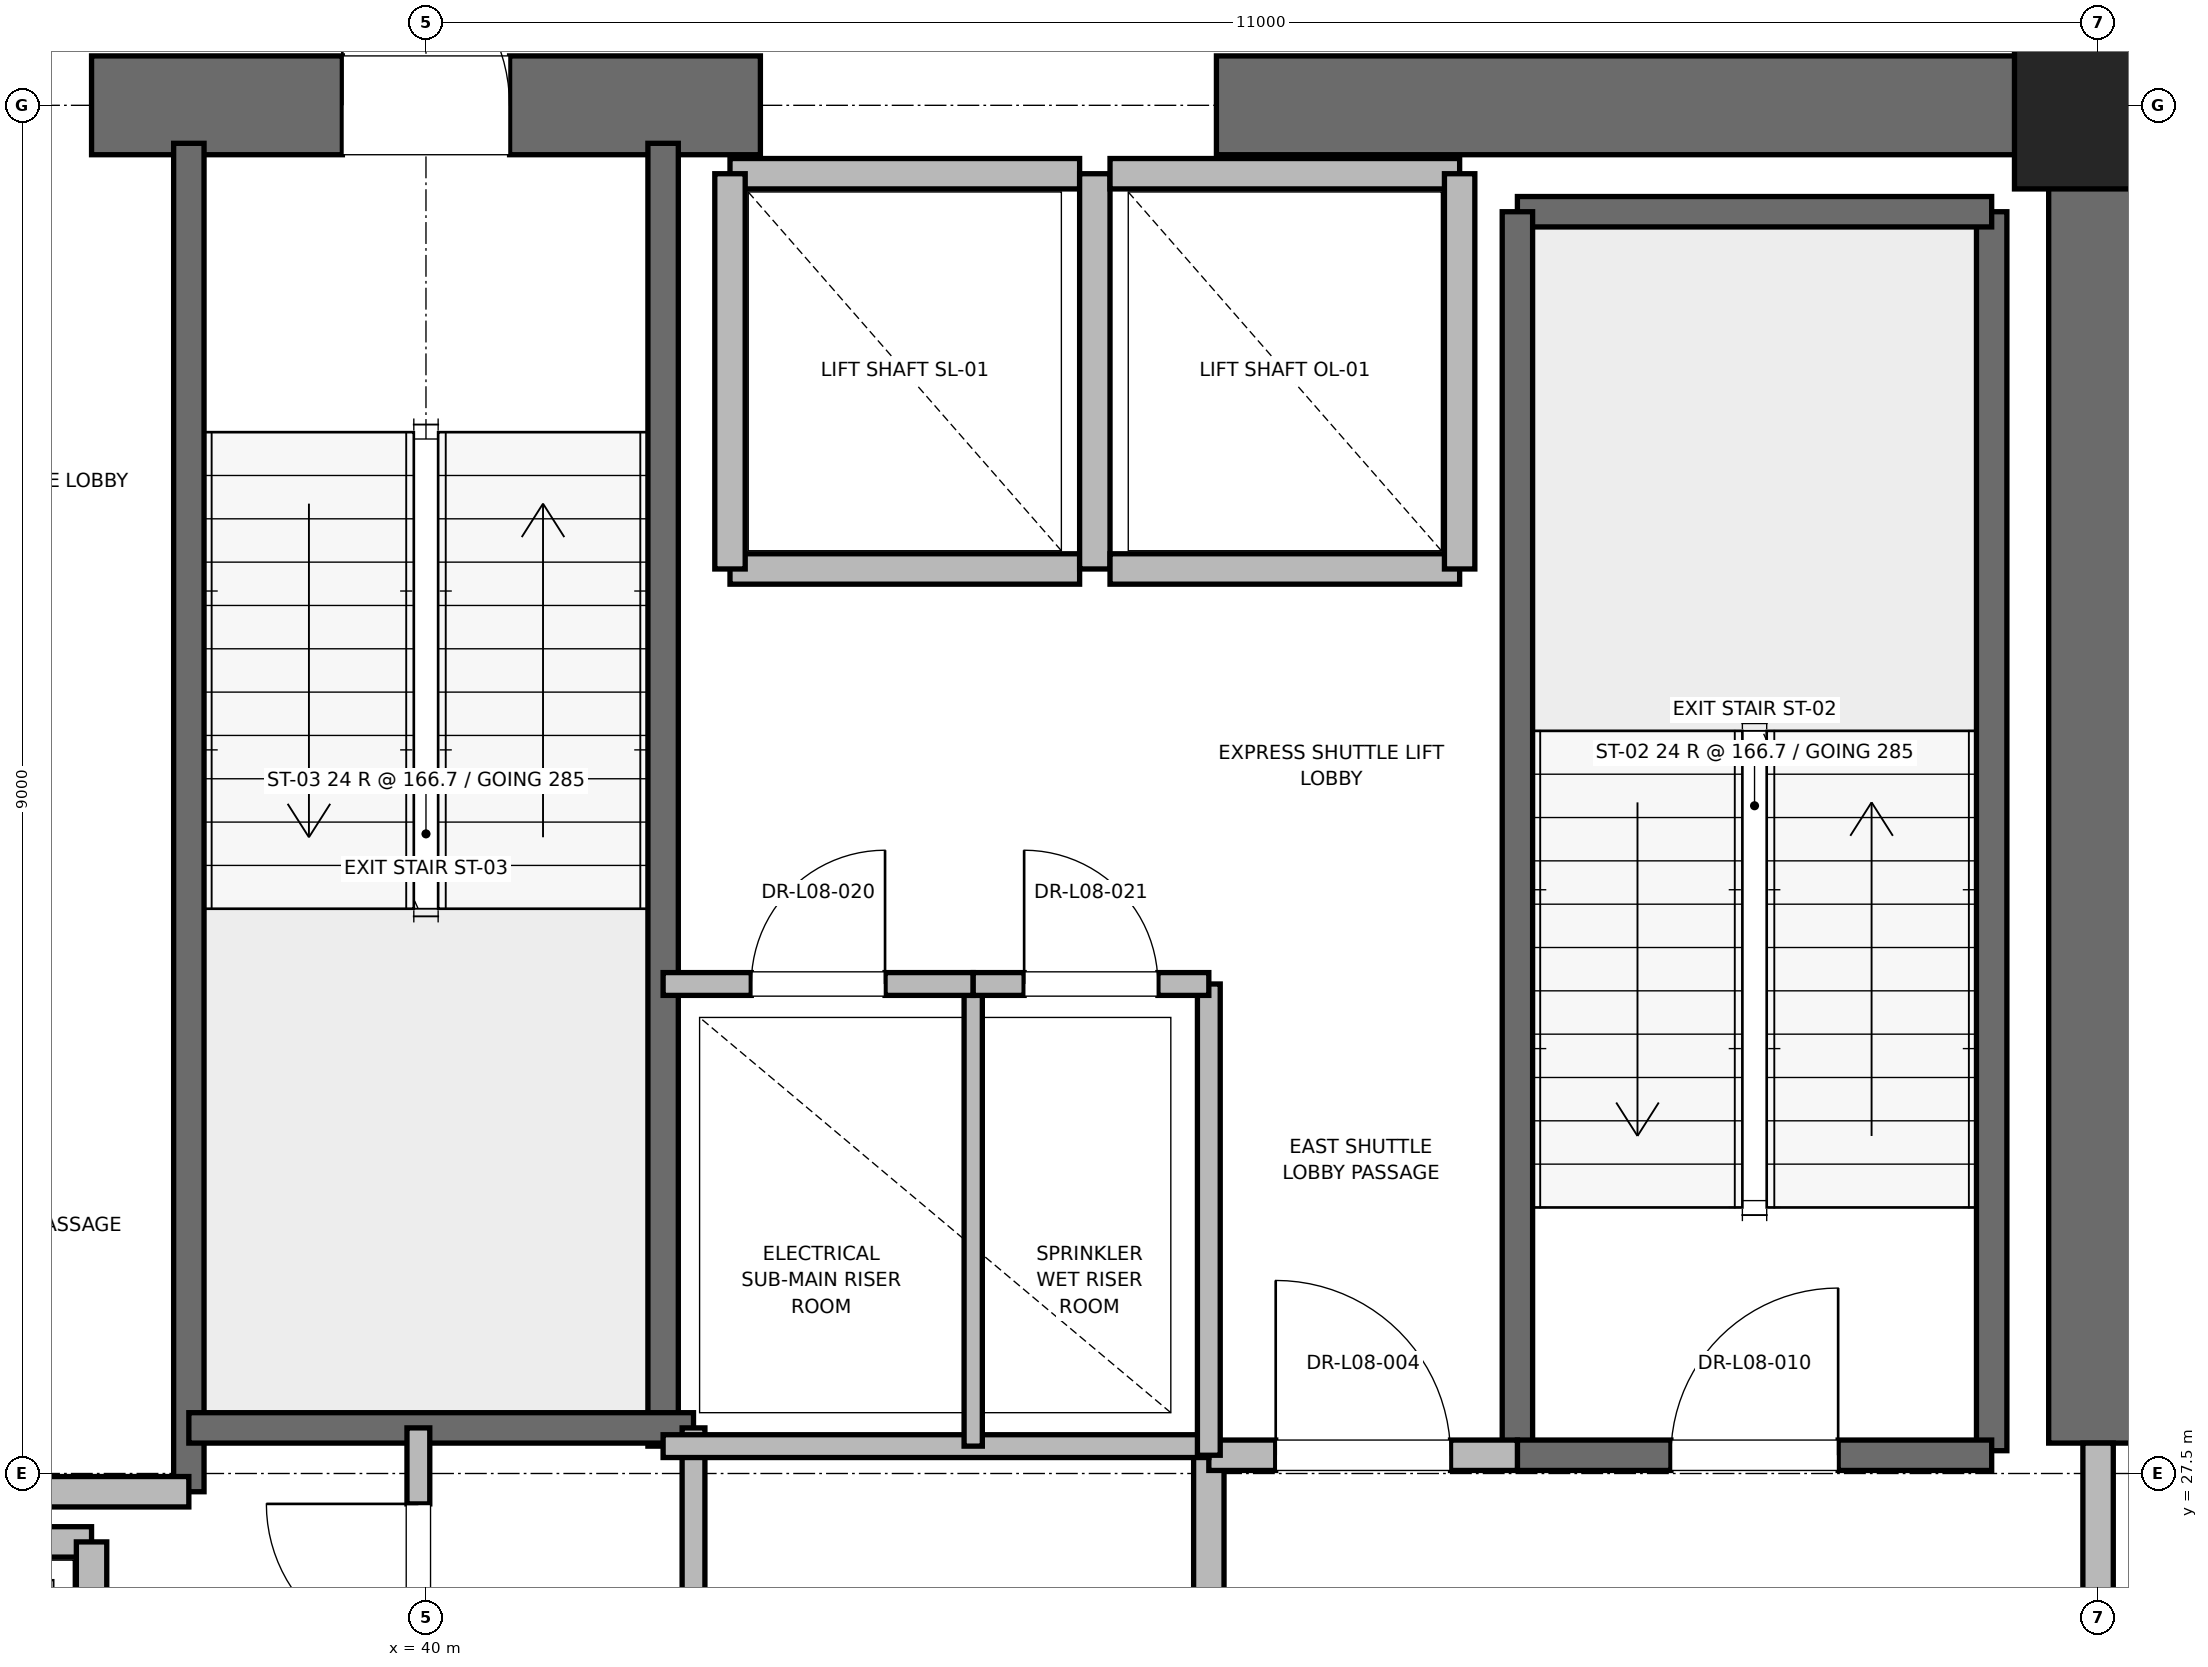
"""IFC4 building model, lengths in metres.
Left out: names, types, materials, properties, quantities, classifications, styles, units other than length and angle.
Written with IfcOpenShell. Run it as: python <this file> out.ifc"""

import sys

from ifc_helpers import new_model, si_unit, direction, frame, frame_2d, origin, origin_2d, place, context, subcontext, project, spatial, rectangle, extrude, element, fill, save


model = new_model("IFC4")
c1 = context("Model", 3, precision=1e-05, world=origin(), true_north=direction((0.0, 1.0)))
c2 = subcontext(c1, "Body", "Model", "MODEL_VIEW")
j1 = project(units=[si_unit("LENGTHUNIT", "METRE"), si_unit("PLANEANGLEUNIT", "RADIAN")], contexts=[c1])
p1 = place(None, origin())
s1 = spatial("IfcSite", under=j1, at=p1, CompositionType="ELEMENT")
p2 = place(p1, origin())
s2 = spatial("IfcBuilding", under=s1, at=p2, CompositionType="ELEMENT")
p3 = place(p2, frame((0.0, 0.0, 39.6)))
s3 = spatial("IfcBuildingStorey", under=s2, at=p3, CompositionType="ELEMENT", Elevation=39.6)
p4 = place(p3, frame((51.0, 36.5, 0.0), z_axis=(0.0, 0.0, 1.0), x_axis=(1.0, 0.0, 0.0)))
e1 = element("IfcColumn", 1, at=p4, inside=s3, PredefinedType="PILASTER", context=c2, shape_type="SweptSolid", body=[
    extrude(rectangle(XDim=1.1, YDim=1.1, at=origin_2d()), origin(), (0.0, 0.0, 1.0), 4.0),
])
p5 = place(p3, frame((37.8, 36.5, 0.0), z_axis=(0.0, 0.0, 1.0), x_axis=(1.0, 0.0, 0.0)))
e2 = element("IfcWall", 2, at=p5, inside=s3, PredefinedType="SHEAR", context=c2, shape_type="SweptSolid", body=[
    extrude(rectangle(XDim=4.4, YDim=0.65, at=frame_2d((2.2, 0.0))), origin(), (0.0, 0.0, 1.0), 3.76),
])
p6 = place(p5, frame((1.65, 0.0, 0.0)))
e3 = element("IfcOpeningElement", 3, at=p6, cuts=e2, PredefinedType="OPENING", context=c2, shape_type="SweptSolid", body=[
    extrude(rectangle(XDim=1.1, YDim=2.15, at=frame_2d((0.55, 1.075))), frame((0.0, 0.325, 0.0), z_axis=(0.0, -1.0, 0.0), x_axis=(1.0, 0.0, 0.0)), (0.0, 0.0, 1.0), 0.65),
])
p7 = place(p3, frame((45.2, 36.5, 0.0), z_axis=(0.0, 0.0, 1.0), x_axis=(1.0, 0.0, 0.0)))
e4 = element("IfcWall", 4, at=p7, inside=s3, PredefinedType="SHEAR", context=c2, shape_type="SweptSolid", body=[
    extrude(rectangle(XDim=5.8, YDim=0.65, at=frame_2d((2.9, 0.0))), origin(), (0.0, 0.0, 1.0), 3.76),
])
p8 = place(p3, frame((51.0, 27.7, 0.0), z_axis=(0.0, 0.0, 1.0), x_axis=(0.0, 1.0, 0.0)))
e5 = element("IfcWall", 5, at=p8, inside=s3, PredefinedType="SHEAR", context=c2, shape_type="SweptSolid", body=[
    extrude(rectangle(XDim=8.8, YDim=0.65, at=frame_2d((4.4, 0.0))), origin(), (0.0, 0.0, 1.0), 3.76),
])
p9 = place(p3, frame((50.3, 27.65, 0.0), z_axis=(0.0, 0.0, 1.0), x_axis=(0.0, 1.0, 0.0)))
e6 = element("IfcWall", 6, at=p9, inside=s3, PredefinedType="SOLIDWALL", context=c2, shape_type="SweptSolid", body=[
    extrude(rectangle(XDim=8.15, YDim=0.2, at=frame_2d((4.075, 0.0))), origin(), (0.0, 0.0, 1.0), 3.76),
])
p10 = place(p3, frame((47.18, 35.8, 0.0), z_axis=(0.0, 0.0, 1.0), x_axis=(1.0, 0.0, 0.0)))
e7 = element("IfcWall", 7, at=p10, inside=s3, PredefinedType="SOLIDWALL", context=c2, shape_type="SweptSolid", body=[
    extrude(rectangle(XDim=3.12, YDim=0.2, at=frame_2d((1.56, 0.0))), origin(), (0.0, 0.0, 1.0), 3.76),
])
p11 = place(p3, frame((47.18, 27.62, 0.0), z_axis=(0.0, 0.0, 1.0), x_axis=(0.0, 1.0, 0.0)))
e8 = element("IfcWall", 8, at=p11, inside=s3, PredefinedType="SOLIDWALL", context=c2, shape_type="SweptSolid", body=[
    extrude(rectangle(XDim=8.18, YDim=0.2, at=frame_2d((4.09, 0.0))), origin(), (0.0, 0.0, 1.0), 3.76),
])
p12 = place(p3, frame((47.18, 27.62, 0.0), z_axis=(0.0, 0.0, 1.0), x_axis=(1.0, 0.0, 0.0)))
e9 = element("IfcWall", 9, at=p12, inside=s3, PredefinedType="SOLIDWALL", context=c2, shape_type="SweptSolid", body=[
    extrude(rectangle(XDim=3.12, YDim=0.2, at=frame_2d((1.56, 0.0))), origin(), (0.0, 0.0, 1.0), 3.76),
])
p13 = place(p12, frame((1.01, 0.0, 0.0)))
e10 = element("IfcOpeningElement", 10, at=p13, cuts=e9, PredefinedType="OPENING", context=c2, shape_type="SweptSolid", body=[
    extrude(rectangle(XDim=1.1, YDim=2.15, at=frame_2d((0.55, 1.075))), frame((0.0, 0.1, 0.0), z_axis=(0.0, -1.0, 0.0), x_axis=(1.0, 0.0, 0.0)), (0.0, 0.0, 1.0), 0.2),
])
p14 = place(p3, frame((38.44, 27.38, 0.0), z_axis=(0.0, 0.0, 1.0), x_axis=(0.0, 1.0, 0.0)))
e11 = element("IfcWall", 11, at=p14, inside=s3, PredefinedType="SOLIDWALL", context=c2, shape_type="SweptSolid", body=[
    extrude(rectangle(XDim=8.87, YDim=0.2, at=frame_2d((4.435, 0.0))), origin(), (0.0, 0.0, 1.0), 3.76),
])
p15 = place(p3, frame((41.56, 27.68, 0.0), z_axis=(0.0, 0.0, 1.0), x_axis=(0.0, 1.0, 0.0)))
e12 = element("IfcWall", 12, at=p15, inside=s3, PredefinedType="SOLIDWALL", context=c2, shape_type="SweptSolid", body=[
    extrude(rectangle(XDim=8.57, YDim=0.2, at=frame_2d((4.285, 0.0))), origin(), (0.0, 0.0, 1.0), 3.76),
])
p16 = place(p3, frame((38.44, 27.8, 0.0), z_axis=(0.0, 0.0, 1.0), x_axis=(1.0, 0.0, 0.0)))
e13 = element("IfcWall", 13, at=p16, inside=s3, PredefinedType="SOLIDWALL", context=c2, shape_type="SweptSolid", body=[
    extrude(rectangle(XDim=3.32, YDim=0.2, at=frame_2d((1.66, 0.0))), origin(), (0.0, 0.0, 1.0), 3.76),
])
p17 = place(p3, frame((32.82, 27.38, 0.0), z_axis=(0.0, 0.0, 1.0), x_axis=(1.0, 0.0, 0.0)))
e14 = element("IfcWall", 14, at=p17, inside=s3, PredefinedType="PARTITIONING", context=c2, shape_type="SweptSolid", body=[
    extrude(rectangle(XDim=5.62, YDim=0.2, at=frame_2d((2.81, 0.0))), origin(), (0.0, 0.0, 1.0), 3.76),
])
p18 = place(p3, frame((45.15, 24.25, 0.0), z_axis=(0.0, 0.0, 1.0), x_axis=(0.0, 1.0, 0.0)))
e15 = element("IfcWall", 15, at=p18, inside=s3, PredefinedType="PARTITIONING", context=c2, shape_type="SweptSolid", body=[
    extrude(rectangle(XDim=3.37, YDim=0.2, at=frame_2d((1.685, 0.0))), origin(), (0.0, 0.0, 1.0), 3.76),
])
p19 = place(p3, frame((45.15, 27.62, 0.0), z_axis=(0.0, 0.0, 1.0), x_axis=(1.0, 0.0, 0.0)))
e16 = element("IfcWall", 16, at=p19, inside=s3, PredefinedType="PARTITIONING", context=c2, shape_type="SweptSolid", body=[
    extrude(rectangle(XDim=2.03, YDim=0.2, at=frame_2d((1.015, 0.0))), origin(), (0.0, 0.0, 1.0), 3.76),
])
p20 = place(p19, frame((0.44, 0.0, 0.0)))
e17 = element("IfcOpeningElement", 17, at=p20, cuts=e16, PredefinedType="OPENING", context=c2, shape_type="SweptSolid", body=[
    extrude(rectangle(XDim=1.15, YDim=2.2, at=frame_2d((0.575, 1.1))), frame((0.0, 0.1, 0.0), z_axis=(0.0, -1.0, 0.0), x_axis=(1.0, 0.0, 0.0)), (0.0, 0.0, 1.0), 0.2),
])
p21 = place(p3, frame((51.0, 24.3, 0.0), z_axis=(0.0, 0.0, 1.0), x_axis=(0.0, 1.0, 0.0)))
e18 = element("IfcWall", 18, at=p21, inside=s3, PredefinedType="PARTITIONING", context=c2, shape_type="SweptSolid", body=[
    extrude(rectangle(XDim=3.4, YDim=0.2, at=frame_2d((1.7, 0.0))), origin(), (0.0, 0.0, 1.0), 2.54),
])
p22 = place(p21, frame((1.125, 0.0, 0.0)))
e19 = element("IfcOpeningElement", 19, at=p22, cuts=e18, PredefinedType="OPENING", context=c2, shape_type="SweptSolid", body=[
    extrude(rectangle(XDim=1.15, YDim=2.2, at=frame_2d((0.575, 1.1))), frame((0.0, 0.1, 0.0), z_axis=(0.0, -1.0, 0.0), x_axis=(1.0, 0.0, 0.0)), (0.0, 0.0, 1.0), 0.2),
])
p23 = place(p3, frame((37.8, 27.05, 0.0), z_axis=(0.0, 0.0, 1.0), x_axis=(-1.0, 0.0, 0.0)))
e20 = element("IfcWall", 20, at=p23, inside=s3, PredefinedType="SOLIDWALL", context=c2, shape_type="SweptSolid", body=[
    extrude(rectangle(XDim=2.3, YDim=0.2, at=frame_2d((1.15, 0.0))), origin(), (0.0, 0.0, 1.0), 3.76),
])
p24 = place(p3, frame((37.8, 24.45, 0.0), z_axis=(0.0, 0.0, 1.0), x_axis=(0.0, 1.0, 0.0)))
e21 = element("IfcWall", 21, at=p24, inside=s3, PredefinedType="SOLIDWALL", context=c2, shape_type="SweptSolid", body=[
    extrude(rectangle(XDim=2.6, YDim=0.2, at=frame_2d((1.3, 0.0))), origin(), (0.0, 0.0, 1.0), 3.76),
])
p25 = place(p3, frame((42.0, 33.45, 0.0), z_axis=(0.0, 0.0, 1.0), x_axis=(1.0, 0.0, 0.0)))
e22 = element("IfcWall", 22, at=p25, inside=s3, PredefinedType="SOLIDWALL", context=c2, shape_type="SweptSolid", body=[
    extrude(rectangle(XDim=2.3, YDim=0.2, at=frame_2d((1.15, 0.0))), origin(), (0.0, 0.0, 1.0), 3.76),
])
p26 = place(p3, frame((44.3, 36.05, 0.0), z_axis=(0.0, 0.0, 1.0), x_axis=(-1.0, 0.0, 0.0)))
e23 = element("IfcWall", 23, at=p26, inside=s3, PredefinedType="SOLIDWALL", context=c2, shape_type="SweptSolid", body=[
    extrude(rectangle(XDim=2.3, YDim=0.2, at=frame_2d((1.15, 0.0))), origin(), (0.0, 0.0, 1.0), 2.54),
])
for number, where, z_axis, x_axis in (
    (24, (42.0, 36.05, 0.0), (0.0, 0.0, 1.0), (0.0, -1.0, 0.0)),
    (25, (44.4, 33.45, 0.0), (0.0, 0.0, 1.0), (0.0, 1.0, 0.0)),
):
    element("IfcWall", number, at=place(p3, frame(where, z_axis=z_axis, x_axis=x_axis)), inside=s3, PredefinedType="SOLIDWALL", context=c2, shape_type="SweptSolid", body=[
        extrude(rectangle(XDim=2.6, YDim=0.2, at=frame_2d((1.3, 0.0))), origin(), (0.0, 0.0, 1.0), 2.54),
    ])
p27 = place(p3, frame((44.5, 33.45, 0.0), z_axis=(0.0, 0.0, 1.0), x_axis=(1.0, 0.0, 0.0)))
e26 = element("IfcWall", 26, at=p27, inside=s3, PredefinedType="SOLIDWALL", context=c2, shape_type="SweptSolid", body=[
    extrude(rectangle(XDim=2.3, YDim=0.2, at=frame_2d((1.15, 0.0))), origin(), (0.0, 0.0, 1.0), 3.76),
])
p28 = place(p3, frame((46.8, 36.05, 0.0), z_axis=(0.0, 0.0, 1.0), x_axis=(-1.0, 0.0, 0.0)))
e27 = element("IfcWall", 27, at=p28, inside=s3, PredefinedType="SOLIDWALL", context=c2, shape_type="SweptSolid", body=[
    extrude(rectangle(XDim=2.3, YDim=0.2, at=frame_2d((1.15, 0.0))), origin(), (0.0, 0.0, 1.0), 2.54),
])
p29 = place(p3, frame((46.8, 33.45, 0.0), z_axis=(0.0, 0.0, 1.0), x_axis=(0.0, 1.0, 0.0)))
e28 = element("IfcWall", 28, at=p29, inside=s3, PredefinedType="SOLIDWALL", context=c2, shape_type="SweptSolid", body=[
    extrude(rectangle(XDim=2.6, YDim=0.2, at=frame_2d((1.3, 0.0))), origin(), (0.0, 0.0, 1.0), 3.76),
])
p30 = place(p3, frame((41.76, 23.8, 0.0), z_axis=(0.0, 0.0, 1.0), x_axis=(0.0, 1.0, 0.0)))
e29 = element("IfcWall", 29, at=p30, inside=s3, PredefinedType="PARTITIONING", context=c2, shape_type="SweptSolid", body=[
    extrude(rectangle(XDim=4.0, YDim=0.15, at=frame_2d((2.0, 0.0))), origin(), (0.0, 0.0, 1.0), 2.85),
])
p31 = place(p3, frame((39.95, 25.8, 0.0), z_axis=(0.0, 0.0, 1.0), x_axis=(0.0, 1.0, 0.0)))
e30 = element("IfcWall", 30, at=p31, inside=s3, PredefinedType="PARTITIONING", context=c2, shape_type="SweptSolid", body=[
    extrude(rectangle(XDim=2.0, YDim=0.15, at=frame_2d((1.0, 0.0))), origin(), (0.0, 0.0, 1.0), 2.85),
])
p32 = place(p31, frame((0.5, 0.0, 0.0)))
e31 = element("IfcOpeningElement", 31, at=p32, cuts=e30, PredefinedType="OPENING", context=c2, shape_type="SweptSolid", body=[
    extrude(rectangle(XDim=1.0, YDim=2.15, at=frame_2d((0.5, 1.075))), frame((0.0, 0.075, 0.0), z_axis=(0.0, -1.0, 0.0), x_axis=(1.0, 0.0, 0.0)), (0.0, 0.0, 1.0), 0.15),
])
p33 = place(p3, frame((41.56, 27.68, 0.0), z_axis=(0.0, 0.0, 1.0), x_axis=(1.0, 0.0, 0.0)))
e32 = element("IfcWall", 32, at=p33, inside=s3, PredefinedType="PARTITIONING", context=c2, shape_type="SweptSolid", body=[
    extrude(rectangle(XDim=3.59, YDim=0.15, at=frame_2d((1.795, 0.0))), origin(), (0.0, 0.0, 1.0), 2.85),
])
p34 = place(p3, frame((45.15, 27.62, 0.0), z_axis=(0.0, 0.0, 1.0), x_axis=(0.0, 1.0, 0.0)))
e33 = element("IfcWall", 33, at=p34, inside=s3, PredefinedType="PARTITIONING", context=c2, shape_type="SweptSolid", body=[
    extrude(rectangle(XDim=3.1, YDim=0.15, at=frame_2d((1.55, 0.0))), origin(), (0.0, 0.0, 1.0), 2.85),
])
p35 = place(p3, frame((43.6, 27.68, 0.0), z_axis=(0.0, 0.0, 1.0), x_axis=(0.0, 1.0, 0.0)))
e34 = element("IfcWall", 34, at=p35, inside=s3, PredefinedType="PARTITIONING", context=c2, shape_type="SweptSolid", body=[
    extrude(rectangle(XDim=3.04, YDim=0.12, at=frame_2d((1.52, 0.0))), origin(), (0.0, 0.0, 1.0), 2.85),
])
p36 = place(p3, frame((41.56, 30.72, 0.0), z_axis=(0.0, 0.0, 1.0), x_axis=(1.0, 0.0, 0.0)))
e35 = element("IfcWall", 35, at=p36, inside=s3, PredefinedType="PARTITIONING", context=c2, shape_type="SweptSolid", body=[
    extrude(rectangle(XDim=2.04, YDim=0.15, at=frame_2d((1.02, 0.0))), origin(), (0.0, 0.0, 1.0), 2.85),
])
p37 = place(p36, frame((0.58, 0.0, 0.0)))
e36 = element("IfcOpeningElement", 36, at=p37, cuts=e35, PredefinedType="OPENING", context=c2, shape_type="SweptSolid", body=[
    extrude(rectangle(XDim=0.88, YDim=2.1, at=frame_2d((0.44, 1.05))), frame((0.0, 0.075, 0.0), z_axis=(0.0, -1.0, 0.0), x_axis=(1.0, 0.0, 0.0)), (0.0, 0.0, 1.0), 0.15),
])
p38 = place(p3, frame((43.6, 30.72, 0.0), z_axis=(0.0, 0.0, 1.0), x_axis=(1.0, 0.0, 0.0)))
e37 = element("IfcWall", 37, at=p38, inside=s3, PredefinedType="PARTITIONING", context=c2, shape_type="SweptSolid", body=[
    extrude(rectangle(XDim=1.55, YDim=0.15, at=frame_2d((0.775, 0.0))), origin(), (0.0, 0.0, 1.0), 2.85),
])
p39 = place(p38, frame((0.335, 0.0, 0.0)))
e38 = element("IfcOpeningElement", 38, at=p39, cuts=e37, PredefinedType="OPENING", context=c2, shape_type="SweptSolid", body=[
    extrude(rectangle(XDim=0.88, YDim=2.1, at=frame_2d((0.44, 1.05))), frame((0.0, 0.075, 0.0), z_axis=(0.0, -1.0, 0.0), x_axis=(1.0, 0.0, 0.0)), (0.0, 0.0, 1.0), 0.15),
])
p40 = place(p13, origin())
e39 = element("IfcDoor", 39, at=p40, inside=s3, OperationType="SINGLE_SWING_RIGHT", PredefinedType="DOOR", context=c2, shape_type="SweptSolid", body=[
    extrude(rectangle(XDim=1.1, YDim=2.15, at=frame_2d((0.55, 1.075))), frame((0.0, 0.025, 0.0), z_axis=(0.0, -1.0, 0.0), x_axis=(1.0, 0.0, 0.0)), (0.0, 0.0, 1.0), 0.05),
])
fill(e10, e39)
p41 = place(p6, origin())
e40 = element("IfcDoor", 40, at=p41, inside=s3, OperationType="SINGLE_SWING_LEFT", PredefinedType="DOOR", context=c2, shape_type="SweptSolid", body=[
    extrude(rectangle(XDim=1.1, YDim=2.15, at=frame_2d((0.55, 1.075))), frame((0.0, 0.025, 0.0), z_axis=(0.0, -1.0, 0.0), x_axis=(1.0, 0.0, 0.0)), (0.0, 0.0, 1.0), 0.05),
])
fill(e3, e40)
p42 = place(p20, origin())
e41 = element("IfcDoor", 41, at=p42, inside=s3, OperationType="SINGLE_SWING_LEFT", PredefinedType="DOOR", context=c2, shape_type="SweptSolid", body=[
    extrude(rectangle(XDim=1.15, YDim=2.2, at=frame_2d((0.575, 1.1))), frame((0.0, 0.025, 0.0), z_axis=(0.0, -1.0, 0.0), x_axis=(1.0, 0.0, 0.0)), (0.0, 0.0, 1.0), 0.05),
])
fill(e17, e41)
p43 = place(p32, origin())
e42 = element("IfcDoor", 42, at=p43, inside=s3, OperationType="SINGLE_SWING_RIGHT", PredefinedType="DOOR", context=c2, shape_type="SweptSolid", body=[
    extrude(rectangle(XDim=1.0, YDim=2.15, at=frame_2d((0.5, 1.075))), frame((0.0, 0.025, 0.0), z_axis=(0.0, -1.0, 0.0), x_axis=(1.0, 0.0, 0.0)), (0.0, 0.0, 1.0), 0.05),
])
fill(e31, e42)
p44 = place(p37, origin())
e43 = element("IfcDoor", 43, at=p44, inside=s3, OperationType="SINGLE_SWING_RIGHT", PredefinedType="DOOR", context=c2, shape_type="SweptSolid", body=[
    extrude(rectangle(XDim=0.88, YDim=2.1, at=frame_2d((0.44, 1.05))), frame((0.0, 0.025, 0.0), z_axis=(0.0, -1.0, 0.0), x_axis=(1.0, 0.0, 0.0)), (0.0, 0.0, 1.0), 0.05),
])
fill(e36, e43)
p45 = place(p39, origin())
e44 = element("IfcDoor", 44, at=p45, inside=s3, OperationType="SINGLE_SWING_LEFT", PredefinedType="DOOR", context=c2, shape_type="SweptSolid", body=[
    extrude(rectangle(XDim=0.88, YDim=2.1, at=frame_2d((0.44, 1.05))), frame((0.0, 0.025, 0.0), z_axis=(0.0, -1.0, 0.0), x_axis=(1.0, 0.0, 0.0)), (0.0, 0.0, 1.0), 0.05),
])
fill(e38, e44)
save(model, sys.argv[1])
